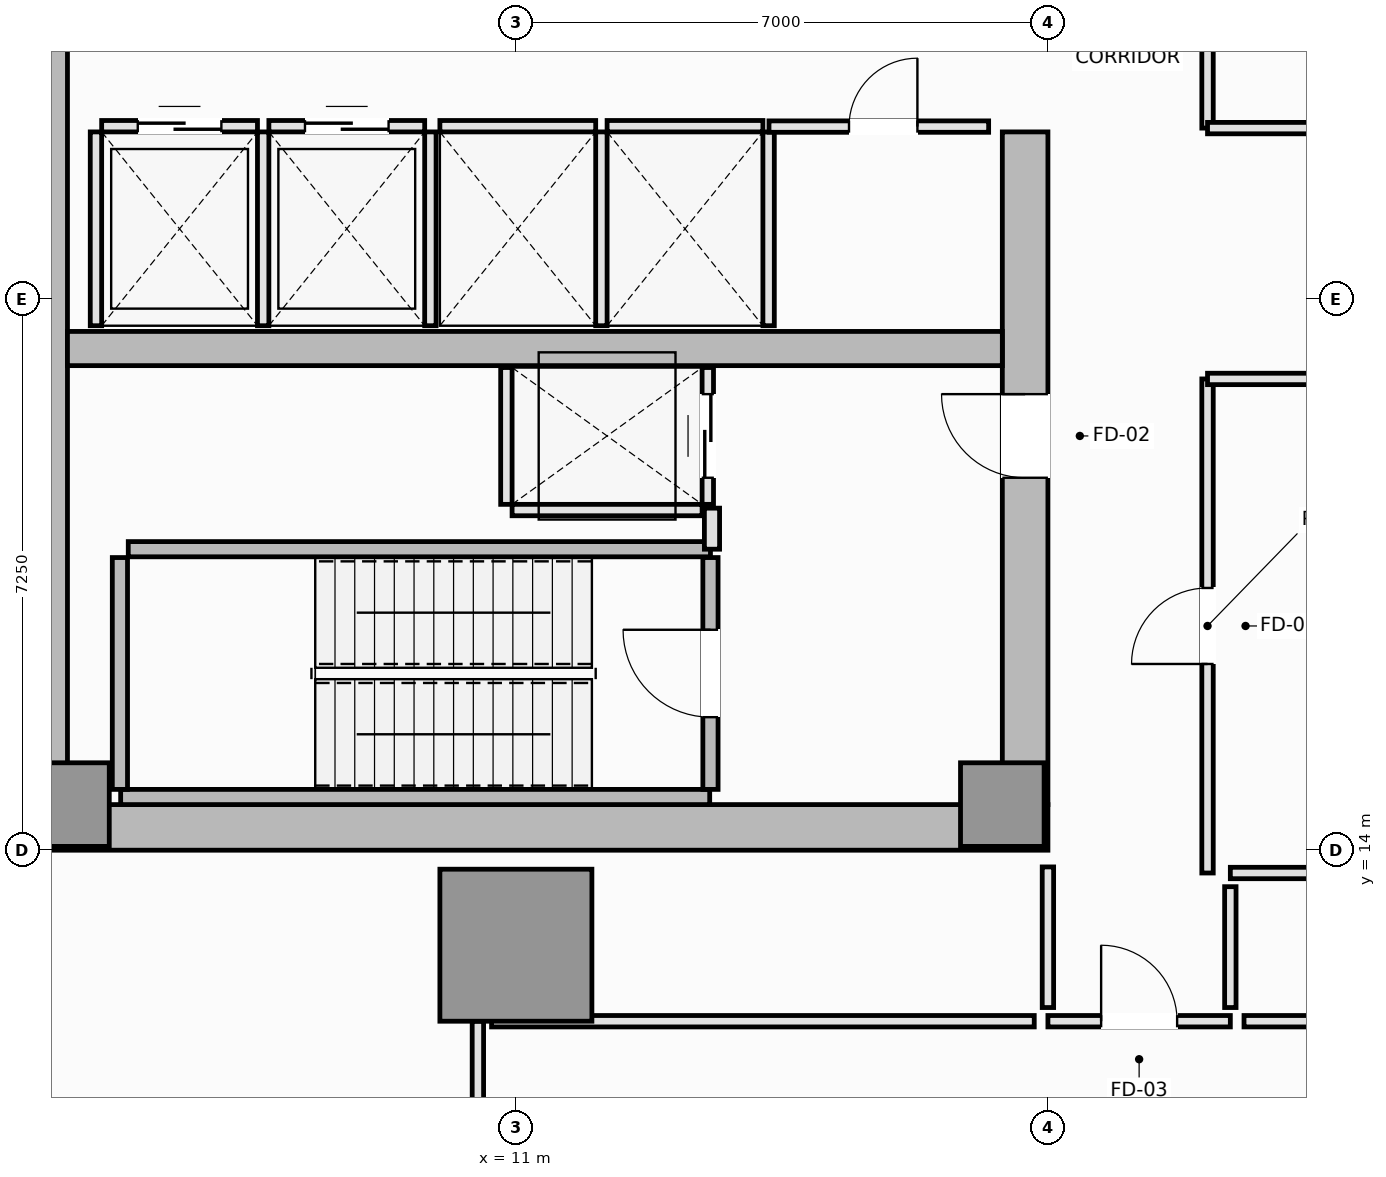
"""IFC4 building model, lengths in metres.
Left out: names, types, materials, properties, quantities, classifications, styles, units other than length and angle.
Written with IfcOpenShell. Run it as: python <this file> out.ifc"""

import sys

from ifc_helpers import new_model, si_unit, direction, frame, frame_2d, origin, origin_2d, place, context, subcontext, project, spatial, rectangle, extrude, element, fill, save


model = new_model("IFC4")
c1 = context("Model", 3, precision=1e-05, world=origin(), true_north=direction((0.0, 1.0)))
c2 = subcontext(c1, "Body", "Model", "MODEL_VIEW")
j1 = project(units=[si_unit("LENGTHUNIT", "METRE"), si_unit("PLANEANGLEUNIT", "RADIAN")], contexts=[c1])
p1 = place(None, origin())
s1 = spatial("IfcSite", under=j1, at=p1, CompositionType="ELEMENT")
p2 = place(p1, origin())
s2 = spatial("IfcBuilding", under=s1, at=p2, CompositionType="ELEMENT")
p3 = place(p2, frame((0.0, 0.0, 173.25)))
s3 = spatial("IfcBuildingStorey", under=s2, at=p3, CompositionType="ELEMENT", Elevation=173.25)
p4 = place(p3, frame((4.5, 14.3, 0.0), z_axis=(0.0, 0.0, 1.0), x_axis=(1.0, 0.0, 0.0)))
e1 = element("IfcWall", 1, at=p4, inside=s3, PredefinedType="SHEAR", context=c2, shape_type="SweptSolid", body=[
    extrude(rectangle(XDim=13.5, YDim=0.6, at=frame_2d((6.75, 0.0))), origin(), (0.0, 0.0, 1.0), 4.8),
])
p5 = place(p3, frame((4.8, 14.6, 0.0), z_axis=(0.0, 0.0, 1.0), x_axis=(0.0, 1.0, 0.0)))
e2 = element("IfcWall", 2, at=p5, inside=s3, PredefinedType="SHEAR", context=c2, shape_type="SweptSolid", body=[
    extrude(rectangle(XDim=21.3, YDim=0.6, at=frame_2d((10.65, 0.0))), origin(), (0.0, 0.0, 1.0), 4.8),
])
p6 = place(p3, frame((17.7, 14.6, 0.0), z_axis=(0.0, 0.0, 1.0), x_axis=(0.0, 1.0, 0.0)))
e3 = element("IfcWall", 3, at=p6, inside=s3, PredefinedType="SHEAR", context=c2, shape_type="SweptSolid", body=[
    extrude(rectangle(XDim=8.85, YDim=0.6, at=frame_2d((4.425, 0.0))), origin(), (0.0, 0.0, 1.0), 4.8),
])
p7 = place(p6, frame((4.3, 0.0, 0.0)))
e4 = element("IfcOpeningElement", 4, at=p7, cuts=e3, PredefinedType="OPENING", context=c2, shape_type="SweptSolid", body=[
    extrude(rectangle(XDim=1.1, YDim=2.15, at=frame_2d((0.55, 1.075))), frame((0.0, 0.31, 0.0), z_axis=(0.0, -1.0, 0.0), x_axis=(1.0, 0.0, 0.0)), (0.0, 0.0, 1.0), 0.62),
])
p8 = place(p3, frame((5.1, 20.6, 0.0), z_axis=(0.0, 0.0, 1.0), x_axis=(1.0, 0.0, 0.0)))
e5 = element("IfcWall", 5, at=p8, inside=s3, PredefinedType="SHEAR", context=c2, shape_type="SweptSolid", body=[
    extrude(rectangle(XDim=12.3, YDim=0.45, at=frame_2d((6.15, 0.0))), origin(), (0.0, 0.0, 1.0), 4.8),
])
for number, where, z_axis, x_axis in (
    (6, (5.1, 14.6, 0.0), (0.0, 0.0, 1.0), (1.0, 0.0, 0.0)),
    (7, (17.4, 14.6, 0.0), (0.0, 0.0, 1.0), (1.0, 0.0, 0.0)),
):
    element("IfcColumn", number, at=place(p3, frame(where, z_axis=z_axis, x_axis=x_axis)), inside=s3, PredefinedType="PILASTER", context=c2, shape_type="SweptSolid", body=[
        extrude(rectangle(XDim=1.1, YDim=1.1, at=origin_2d()), origin(), (0.0, 0.0, 1.0), 4.8),
    ])
p9 = place(p3, frame((11.0, 12.75, 0.0), z_axis=(0.0, 0.0, 1.0), x_axis=(1.0, 0.0, 0.0)))
e8 = element("IfcColumn", 8, at=p9, inside=s3, PredefinedType="COLUMN", context=c2, shape_type="SweptSolid", body=[
    extrude(rectangle(XDim=2.0, YDim=2.0, at=origin_2d()), origin(), (0.0, 0.0, 1.0), 4.8),
])
p10 = place(p3, frame((5.8, 14.7, 0.0), z_axis=(0.0, 0.0, 1.0), x_axis=(1.0, 0.0, 0.0)))
e9 = element("IfcWall", 9, at=p10, inside=s3, PredefinedType="SOLIDWALL", context=c2, shape_type="SweptSolid", body=[
    extrude(rectangle(XDim=7.75, YDim=0.2, at=frame_2d((3.875, 0.0))), origin(), (0.0, 0.0, 1.0), 4.8),
])
p11 = place(p3, frame((5.79, 14.8, 0.0), z_axis=(0.0, 0.0, 1.0), x_axis=(0.0, 1.0, 0.0)))
e10 = element("IfcWall", 10, at=p11, inside=s3, PredefinedType="SOLIDWALL", context=c2, shape_type="SweptSolid", body=[
    extrude(rectangle(XDim=3.05, YDim=0.2, at=frame_2d((1.525, 0.0))), origin(), (0.0, 0.0, 1.0), 4.8),
])
p12 = place(p3, frame((5.9, 17.96, 0.0), z_axis=(0.0, 0.0, 1.0), x_axis=(1.0, 0.0, 0.0)))
e11 = element("IfcWall", 11, at=p12, inside=s3, PredefinedType="SOLIDWALL", context=c2, shape_type="SweptSolid", body=[
    extrude(rectangle(XDim=7.66, YDim=0.2, at=frame_2d((3.83, 0.0))), origin(), (0.0, 0.0, 1.0), 4.8),
])
p13 = place(p3, frame((13.56, 14.8, 0.0), z_axis=(0.0, 0.0, 1.0), x_axis=(0.0, 1.0, 0.0)))
e12 = element("IfcWall", 12, at=p13, inside=s3, PredefinedType="SOLIDWALL", context=c2, shape_type="SweptSolid", body=[
    extrude(rectangle(XDim=3.05, YDim=0.2, at=frame_2d((1.525, 0.0))), origin(), (0.0, 0.0, 1.0), 4.8),
])
p14 = place(p13, frame((0.95, 0.0, 0.0)))
e13 = element("IfcOpeningElement", 13, at=p14, cuts=e12, PredefinedType="OPENING", context=c2, shape_type="SweptSolid", body=[
    extrude(rectangle(XDim=1.15, YDim=2.15, at=frame_2d((0.575, 1.075))), frame((0.0, 0.11, 0.0), z_axis=(0.0, -1.0, 0.0), x_axis=(1.0, 0.0, 0.0)), (0.0, 0.0, 1.0), 0.22),
])
p15 = place(p3, frame((5.55, 23.525, 0.0), z_axis=(0.0, 0.0, 1.0), x_axis=(1.0, 0.0, 0.0)))
e14 = element("IfcWall", 14, at=p15, inside=s3, PredefinedType="PARTITIONING", context=c2, shape_type="SweptSolid", body=[
    extrude(rectangle(XDim=2.05, YDim=0.15, at=frame_2d((1.025, 0.0))), origin(), (0.0, 0.0, 1.0), 4.6),
])
p16 = place(p15, frame((0.475, 0.0, 0.0)))
e15 = element("IfcOpeningElement", 15, at=p16, cuts=e14, PredefinedType="OPENING", context=c2, shape_type="SweptSolid", body=[
    extrude(rectangle(XDim=1.1, YDim=2.2, at=frame_2d((0.55, 1.1))), frame((0.0, 0.085, 0.0), z_axis=(0.0, -1.0, 0.0), x_axis=(1.0, 0.0, 0.0)), (0.0, 0.0, 1.0), 0.17),
])
for number, where, z_axis, x_axis in (
    (16, (5.475, 20.9, 0.0), (0.0, 0.0, 1.0), (0.0, 1.0, 0.0)),
    (17, (7.675, 20.9, 0.0), (0.0, 0.0, 1.0), (0.0, 1.0, 0.0)),
):
    element("IfcWall", number, at=place(p3, frame(where, z_axis=z_axis, x_axis=x_axis)), inside=s3, PredefinedType="PARTITIONING", context=c2, shape_type="SweptSolid", body=[
        extrude(rectangle(XDim=2.55, YDim=0.15, at=frame_2d((1.275, 0.0))), origin(), (0.0, 0.0, 1.0), 4.6),
    ])
p17 = place(p3, frame((7.75, 23.525, 0.0), z_axis=(0.0, 0.0, 1.0), x_axis=(1.0, 0.0, 0.0)))
e18 = element("IfcWall", 18, at=p17, inside=s3, PredefinedType="PARTITIONING", context=c2, shape_type="SweptSolid", body=[
    extrude(rectangle(XDim=2.05, YDim=0.15, at=frame_2d((1.025, 0.0))), origin(), (0.0, 0.0, 1.0), 4.6),
])
p18 = place(p17, frame((0.475, 0.0, 0.0)))
e19 = element("IfcOpeningElement", 19, at=p18, cuts=e18, PredefinedType="OPENING", context=c2, shape_type="SweptSolid", body=[
    extrude(rectangle(XDim=1.1, YDim=2.2, at=frame_2d((0.55, 1.1))), frame((0.0, 0.085, 0.0), z_axis=(0.0, -1.0, 0.0), x_axis=(1.0, 0.0, 0.0)), (0.0, 0.0, 1.0), 0.17),
])
p19 = place(p3, frame((9.875, 20.9, 0.0), z_axis=(0.0, 0.0, 1.0), x_axis=(0.0, 1.0, 0.0)))
e20 = element("IfcWall", 20, at=p19, inside=s3, PredefinedType="PARTITIONING", context=c2, shape_type="SweptSolid", body=[
    extrude(rectangle(XDim=2.55, YDim=0.15, at=frame_2d((1.275, 0.0))), origin(), (0.0, 0.0, 1.0), 4.6),
])
p20 = place(p3, frame((10.0, 23.525, 0.0), z_axis=(0.0, 0.0, 1.0), x_axis=(1.0, 0.0, 0.0)))
e21 = element("IfcWall", 21, at=p20, inside=s3, PredefinedType="PARTITIONING", context=c2, shape_type="SweptSolid", body=[
    extrude(rectangle(XDim=2.05, YDim=0.15, at=frame_2d((1.025, 0.0))), origin(), (0.0, 0.0, 1.0), 4.6),
])
p21 = place(p3, frame((12.125, 20.9, 0.0), z_axis=(0.0, 0.0, 1.0), x_axis=(0.0, 1.0, 0.0)))
e22 = element("IfcWall", 22, at=p21, inside=s3, PredefinedType="PARTITIONING", context=c2, shape_type="SweptSolid", body=[
    extrude(rectangle(XDim=2.55, YDim=0.15, at=frame_2d((1.275, 0.0))), origin(), (0.0, 0.0, 1.0), 4.6),
])
p22 = place(p3, frame((12.2, 23.525, 0.0), z_axis=(0.0, 0.0, 1.0), x_axis=(1.0, 0.0, 0.0)))
e23 = element("IfcWall", 23, at=p22, inside=s3, PredefinedType="PARTITIONING", context=c2, shape_type="SweptSolid", body=[
    extrude(rectangle(XDim=2.05, YDim=0.15, at=frame_2d((1.025, 0.0))), origin(), (0.0, 0.0, 1.0), 4.6),
])
p23 = place(p3, frame((14.325, 20.9, 0.0), z_axis=(0.0, 0.0, 1.0), x_axis=(0.0, 1.0, 0.0)))
e24 = element("IfcWall", 24, at=p23, inside=s3, PredefinedType="PARTITIONING", context=c2, shape_type="SweptSolid", body=[
    extrude(rectangle(XDim=2.55, YDim=0.15, at=frame_2d((1.275, 0.0))), origin(), (0.0, 0.0, 1.0), 4.6),
])
p24 = place(p3, frame((10.95, 18.475, 0.0), z_axis=(0.0, 0.0, 1.0), x_axis=(1.0, 0.0, 0.0)))
e25 = element("IfcWall", 25, at=p24, inside=s3, PredefinedType="PARTITIONING", context=c2, shape_type="SweptSolid", body=[
    extrude(rectangle(XDim=2.5, YDim=0.15, at=frame_2d((1.25, 0.0))), origin(), (0.0, 0.0, 1.0), 4.6),
])
p25 = place(p3, frame((10.875, 18.55, 0.0), z_axis=(0.0, 0.0, 1.0), x_axis=(0.0, 1.0, 0.0)))
e26 = element("IfcWall", 26, at=p25, inside=s3, PredefinedType="PARTITIONING", context=c2, shape_type="SweptSolid", body=[
    extrude(rectangle(XDim=1.8, YDim=0.15, at=frame_2d((0.9, 0.0))), origin(), (0.0, 0.0, 1.0), 4.6),
])
p26 = place(p3, frame((13.525, 18.55, 0.0), z_axis=(0.0, 0.0, 1.0), x_axis=(0.0, 1.0, 0.0)))
e27 = element("IfcWall", 27, at=p26, inside=s3, PredefinedType="PARTITIONING", context=c2, shape_type="SweptSolid", body=[
    extrude(rectangle(XDim=1.8, YDim=0.15, at=frame_2d((0.9, 0.0))), origin(), (0.0, 0.0, 1.0), 4.6),
])
p27 = place(p26, frame((0.35, 0.0, 0.0)))
e28 = element("IfcOpeningElement", 28, at=p27, cuts=e27, PredefinedType="OPENING", context=c2, shape_type="SweptSolid", body=[
    extrude(rectangle(XDim=1.1, YDim=2.2, at=frame_2d((0.55, 1.1))), frame((0.0, 0.085, 0.0), z_axis=(0.0, -1.0, 0.0), x_axis=(1.0, 0.0, 0.0)), (0.0, 0.0, 1.0), 0.17),
])
p28 = place(p3, frame((13.58, 17.96, 0.0), z_axis=(0.0, 0.0, 1.0), x_axis=(0.0, 1.0, 0.0)))
e29 = element("IfcWall", 29, at=p28, inside=s3, PredefinedType="PARTITIONING", context=c2, shape_type="SweptSolid", body=[
    extrude(rectangle(XDim=0.54, YDim=0.2, at=frame_2d((0.27, 0.0))), origin(), (0.0, 0.0, 1.0), 4.6),
])
p29 = place(p3, frame((14.33, 23.52, 0.0), z_axis=(0.0, 0.0, 1.0), x_axis=(1.0, 0.0, 0.0)))
e30 = element("IfcWall", 30, at=p29, inside=s3, PredefinedType="PARTITIONING", context=c2, shape_type="SweptSolid", body=[
    extrude(rectangle(XDim=2.89, YDim=0.15, at=frame_2d((1.445, 0.0))), origin(), (0.0, 0.0, 1.0), 4.6),
])
p30 = place(p29, frame((1.053, 0.0, 0.0)))
e31 = element("IfcOpeningElement", 31, at=p30, cuts=e30, PredefinedType="OPENING", context=c2, shape_type="SweptSolid", body=[
    extrude(rectangle(XDim=0.9, YDim=2.1, at=frame_2d((0.45, 1.05))), frame((0.0, 0.085, 0.0), z_axis=(0.0, -1.0, 0.0), x_axis=(1.0, 0.0, 0.0)), (0.0, 0.0, 1.0), 0.17),
])
p31 = place(p3, frame((20.1, 13.7, 0.0), z_axis=(0.0, 0.0, 1.0), x_axis=(0.0, 1.0, 0.0)))
e32 = element("IfcWall", 32, at=p31, inside=s3, PredefinedType="PARTITIONING", context=c2, shape_type="SweptSolid", body=[
    extrude(rectangle(XDim=6.5, YDim=0.15, at=frame_2d((3.25, 0.0))), origin(), (0.0, 0.0, 1.0), 4.6),
])
p32 = place(p31, frame((2.75, 0.0, 0.0)))
e33 = element("IfcOpeningElement", 33, at=p32, cuts=e32, PredefinedType="OPENING", context=c2, shape_type="SweptSolid", body=[
    extrude(rectangle(XDim=1.0, YDim=2.15, at=frame_2d((0.5, 1.075))), frame((0.0, 0.085, 0.0), z_axis=(0.0, -1.0, 0.0), x_axis=(1.0, 0.0, 0.0)), (0.0, 0.0, 1.0), 0.17),
])
p33 = place(p3, frame((20.1, 23.5, 0.0), z_axis=(0.0, 0.0, 1.0), x_axis=(0.0, 1.0, 0.0)))
e34 = element("IfcWall", 34, at=p33, inside=s3, PredefinedType="PARTITIONING", context=c2, shape_type="SweptSolid", body=[
    extrude(rectangle(XDim=13.3, YDim=0.15, at=frame_2d((6.65, 0.0))), origin(), (0.0, 0.0, 1.0), 4.6),
])
p34 = place(p33, frame((6.15, 0.0, 0.0)))
e35 = element("IfcOpeningElement", 35, at=p34, cuts=e34, PredefinedType="OPENING", context=c2, shape_type="SweptSolid", body=[
    extrude(rectangle(XDim=1.0, YDim=2.15, at=frame_2d((0.5, 1.075))), frame((0.0, 0.085, 0.0), z_axis=(0.0, -1.0, 0.0), x_axis=(1.0, 0.0, 0.0)), (0.0, 0.0, 1.0), 0.17),
])
p35 = place(p3, frame((18.0, 11.75, 0.0), z_axis=(0.0, 0.0, 1.0), x_axis=(1.0, 0.0, 0.0)))
e36 = element("IfcWall", 36, at=p35, inside=s3, PredefinedType="PARTITIONING", context=c2, shape_type="SweptSolid", body=[
    extrude(rectangle(XDim=2.4, YDim=0.15, at=frame_2d((1.2, 0.0))), origin(), (0.0, 0.0, 1.0), 4.6),
])
p36 = place(p35, frame((0.7, 0.0, 0.0)))
e37 = element("IfcOpeningElement", 37, at=p36, cuts=e36, PredefinedType="OPENING", context=c2, shape_type="SweptSolid", body=[
    extrude(rectangle(XDim=1.0, YDim=2.15, at=frame_2d((0.5, 1.075))), frame((0.0, 0.085, 0.0), z_axis=(0.0, -1.0, 0.0), x_axis=(1.0, 0.0, 0.0)), (0.0, 0.0, 1.0), 0.17),
])
p37 = place(p3, frame((20.1, 20.2, 0.0), z_axis=(0.0, 0.0, 1.0), x_axis=(1.0, 0.0, 0.0)))
e38 = element("IfcWall", 38, at=p37, inside=s3, PredefinedType="PARTITIONING", context=c2, shape_type="SweptSolid", body=[
    extrude(rectangle(XDim=14.5, YDim=0.15, at=frame_2d((7.25, 0.0))), origin(), (0.0, 0.0, 1.0), 4.6),
])
p38 = place(p3, frame((20.1, 23.5, 0.0), z_axis=(0.0, 0.0, 1.0), x_axis=(1.0, 0.0, 0.0)))
e39 = element("IfcWall", 39, at=p38, inside=s3, PredefinedType="PARTITIONING", context=c2, shape_type="SweptSolid", body=[
    extrude(rectangle(XDim=17.1, YDim=0.15, at=frame_2d((8.55, 0.0))), origin(), (0.0, 0.0, 1.0), 4.6),
])
p39 = place(p3, frame((34.42, 13.7, 0.0), z_axis=(0.0, 0.0, 1.0), x_axis=(-1.0, 0.0, 0.0)))
e40 = element("IfcWall", 40, at=p39, inside=s3, PredefinedType="PARTITIONING", context=c2, shape_type="SweptSolid", body=[
    extrude(rectangle(XDim=14.02, YDim=0.15, at=frame_2d((7.01, 0.0))), origin(), (0.0, 0.0, 1.0), 4.6),
])
p40 = place(p3, frame((20.4, 13.52, 0.0), z_axis=(0.0, 0.0, 1.0), x_axis=(0.0, -1.0, 0.0)))
e41 = element("IfcWall", 41, at=p40, inside=s3, PredefinedType="PARTITIONING", context=c2, shape_type="SweptSolid", body=[
    extrude(rectangle(XDim=1.59, YDim=0.15, at=frame_2d((0.795, 0.0))), origin(), (0.0, 0.0, 1.0), 4.6),
])
p41 = place(p3, frame((20.58, 11.75, 0.0), z_axis=(0.0, 0.0, 1.0), x_axis=(1.0, 0.0, 0.0)))
e42 = element("IfcWall", 42, at=p41, inside=s3, PredefinedType="PARTITIONING", context=c2, shape_type="SweptSolid", body=[
    extrude(rectangle(XDim=16.62, YDim=0.15, at=frame_2d((8.31, 0.0))), origin(), (0.0, 0.0, 1.0), 4.6),
])
p42 = place(p3, frame((10.5, 3.82, 0.0), z_axis=(0.0, 0.0, 1.0), x_axis=(0.0, 1.0, 0.0)))
e43 = element("IfcWall", 43, at=p42, inside=s3, PredefinedType="PARTITIONING", context=c2, shape_type="SweptSolid", body=[
    extrude(rectangle(XDim=7.93, YDim=0.15, at=frame_2d((3.965, 0.0))), origin(), (0.0, 0.0, 1.0), 2.6),
])
p43 = place(p3, frame((10.68, 11.75, 0.0), z_axis=(0.0, 0.0, 1.0), x_axis=(1.0, 0.0, 0.0)))
e44 = element("IfcWall", 44, at=p43, inside=s3, PredefinedType="PARTITIONING", context=c2, shape_type="SweptSolid", body=[
    extrude(rectangle(XDim=7.14, YDim=0.15, at=frame_2d((3.57, 0.0))), origin(), (0.0, 0.0, 1.0), 4.6),
])
p44 = place(p3, frame((18.0, 11.93, 0.0), z_axis=(0.0, 0.0, 1.0), x_axis=(0.0, 1.0, 0.0)))
e45 = element("IfcWall", 45, at=p44, inside=s3, PredefinedType="PARTITIONING", context=c2, shape_type="SweptSolid", body=[
    extrude(rectangle(XDim=1.85, YDim=0.15, at=frame_2d((0.925, 0.0))), origin(), (0.0, 0.0, 1.0), 4.6),
])
p45 = place(p14, origin())
e46 = element("IfcDoor", 46, at=p45, inside=s3, OperationType="SINGLE_SWING_RIGHT", PredefinedType="DOOR", context=c2, shape_type="SweptSolid", body=[
    extrude(rectangle(XDim=1.15, YDim=2.15, at=frame_2d((0.575, 1.075))), frame((0.0, 0.025, 0.0), z_axis=(0.0, -1.0, 0.0), x_axis=(1.0, 0.0, 0.0)), (0.0, 0.0, 1.0), 0.05),
])
fill(e13, e46)
p46 = place(p16, origin())
e47 = element("IfcDoor", 47, at=p46, inside=s3, OperationType="DOUBLE_DOOR_SLIDING", PredefinedType="DOOR", context=c2, shape_type="SweptSolid", body=[
    extrude(rectangle(XDim=1.1, YDim=2.2, at=frame_2d((0.55, 1.1))), frame((0.0, 0.025, 0.0), z_axis=(0.0, -1.0, 0.0), x_axis=(1.0, 0.0, 0.0)), (0.0, 0.0, 1.0), 0.05),
])
fill(e15, e47)
p47 = place(p18, origin())
e48 = element("IfcDoor", 48, at=p47, inside=s3, OperationType="DOUBLE_DOOR_SLIDING", PredefinedType="DOOR", context=c2, shape_type="SweptSolid", body=[
    extrude(rectangle(XDim=1.1, YDim=2.2, at=frame_2d((0.55, 1.1))), frame((0.0, 0.025, 0.0), z_axis=(0.0, -1.0, 0.0), x_axis=(1.0, 0.0, 0.0)), (0.0, 0.0, 1.0), 0.05),
])
fill(e19, e48)
p48 = place(p27, origin())
e49 = element("IfcDoor", 49, at=p48, inside=s3, OperationType="DOUBLE_DOOR_SLIDING", PredefinedType="DOOR", context=c2, shape_type="SweptSolid", body=[
    extrude(rectangle(XDim=1.1, YDim=2.2, at=frame_2d((0.55, 1.1))), frame((0.0, 0.025, 0.0), z_axis=(0.0, -1.0, 0.0), x_axis=(1.0, 0.0, 0.0)), (0.0, 0.0, 1.0), 0.05),
])
fill(e28, e49)
p49 = place(p7, origin())
e50 = element("IfcDoor", 50, at=p49, inside=s3, OperationType="SINGLE_SWING_RIGHT", PredefinedType="DOOR", context=c2, shape_type="SweptSolid", body=[
    extrude(rectangle(XDim=1.1, YDim=2.15, at=frame_2d((0.55, 1.075))), frame((0.0, 0.025, 0.0), z_axis=(0.0, -1.0, 0.0), x_axis=(1.0, 0.0, 0.0)), (0.0, 0.0, 1.0), 0.05),
])
fill(e4, e50)
p50 = place(p30, origin())
e51 = element("IfcDoor", 51, at=p50, inside=s3, OperationType="SINGLE_SWING_RIGHT", PredefinedType="DOOR", context=c2, shape_type="SweptSolid", body=[
    extrude(rectangle(XDim=0.9, YDim=2.1, at=frame_2d((0.45, 1.05))), frame((0.0, 0.025, 0.0), z_axis=(0.0, -1.0, 0.0), x_axis=(1.0, 0.0, 0.0)), (0.0, 0.0, 1.0), 0.05),
])
fill(e31, e51)
p51 = place(p32, origin())
e52 = element("IfcDoor", 52, at=p51, inside=s3, OperationType="SINGLE_SWING_LEFT", PredefinedType="DOOR", context=c2, shape_type="SweptSolid", body=[
    extrude(rectangle(XDim=1.0, YDim=2.15, at=frame_2d((0.5, 1.075))), frame((0.0, 0.025, 0.0), z_axis=(0.0, -1.0, 0.0), x_axis=(1.0, 0.0, 0.0)), (0.0, 0.0, 1.0), 0.05),
])
fill(e33, e52)
p52 = place(p36, origin())
e53 = element("IfcDoor", 53, at=p52, inside=s3, OperationType="SINGLE_SWING_LEFT", PredefinedType="DOOR", context=c2, shape_type="SweptSolid", body=[
    extrude(rectangle(XDim=1.0, YDim=2.15, at=frame_2d((0.5, 1.075))), frame((0.0, 0.025, 0.0), z_axis=(0.0, -1.0, 0.0), x_axis=(1.0, 0.0, 0.0)), (0.0, 0.0, 1.0), 0.05),
])
fill(e37, e53)
save(model, sys.argv[1])
